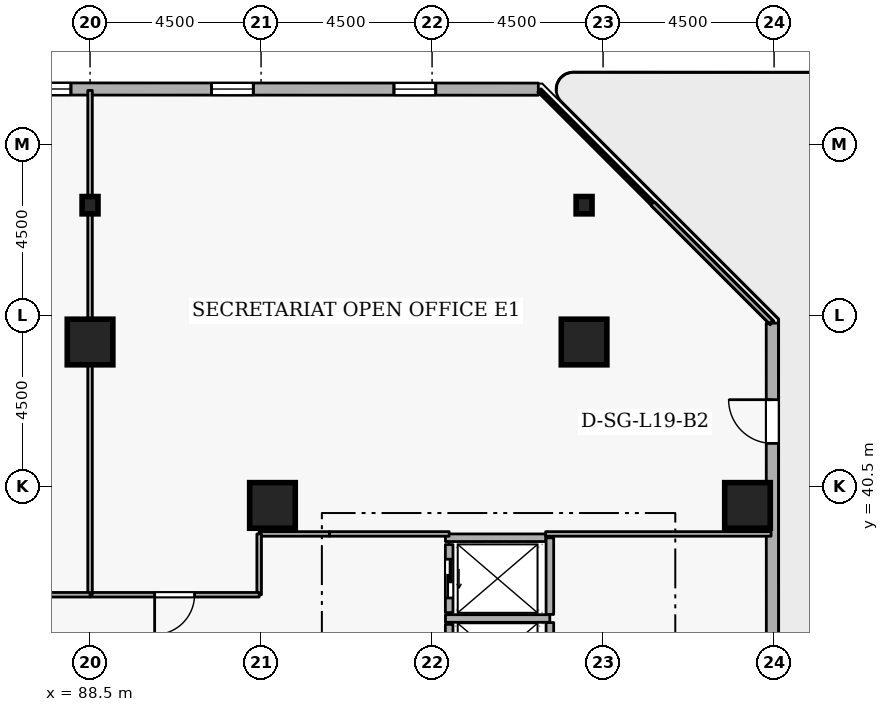
"""IFC4 building model, lengths in metres.
Left out: names, types, materials, properties, quantities, classifications, styles, units other than length and angle.
Written with IfcOpenShell. Run it as: python <this file> out.ifc"""

import sys

from ifc_helpers import new_model, si_unit, direction, frame, frame_2d, origin, origin_2d, place, context, subcontext, project, spatial, rectangle, i_section, extrude, element, fill, save


model = new_model("IFC4")
c1 = context("Model", 3, precision=1e-05, world=origin(), true_north=direction((0.0, 1.0)))
c2 = subcontext(c1, "Body", "Model", "MODEL_VIEW")
j1 = project(units=[si_unit("LENGTHUNIT", "METRE"), si_unit("PLANEANGLEUNIT", "RADIAN")], contexts=[c1])
p1 = place(None, origin())
s1 = spatial("IfcSite", under=j1, at=p1, CompositionType="ELEMENT")
p2 = place(p1, origin())
s2 = spatial("IfcBuilding", under=s1, at=p2, CompositionType="ELEMENT")
p3 = place(p2, frame((0.0, 0.0, 75.9)))
s3 = spatial("IfcBuildingStorey", under=s2, at=p3, CompositionType="ELEMENT", Elevation=75.9)
for number, where, z_axis, x_axis in (
    (1, (105.8, 40.0, 0.0), (0.0, 0.0, 1.0), (1.0, 0.0, 0.0)),
    (2, (101.5, 44.3, 0.0), (0.0, 0.0, 1.0), (1.0, 0.0, 0.0)),
    (3, (88.5, 44.3, 0.0), (0.0, 0.0, 1.0), (1.0, 0.0, 0.0)),
    (4, (93.3, 40.0, 0.0), (0.0, 0.0, 1.0), (1.0, 0.0, 0.0)),
):
    element("IfcColumn", number, at=place(p3, frame(where, z_axis=z_axis, x_axis=x_axis)), inside=s3, PredefinedType="COLUMN", context=c2, shape_type="SweptSolid", body=[
        extrude(rectangle(XDim=1.2, YDim=1.2, at=origin_2d()), origin(), (0.0, 0.0, 1.0), 4.2),
    ])
for number, where, z_axis, x_axis in (
    (5, (101.5, 47.9, 0.0), (0.0, 0.0, 1.0), (1.0, 0.0, 0.0)),
    (6, (88.5, 47.9, 0.0), (0.0, 0.0, 1.0), (1.0, 0.0, 0.0)),
):
    element("IfcColumn", number, at=place(p3, frame(where, z_axis=z_axis, x_axis=x_axis)), inside=s3, PredefinedType="COLUMN", context=c2, shape_type="SweptSolid", body=[
        extrude(i_section(OverallWidth=0.418, OverallDepth=0.456, WebThickness=0.042, FlangeThickness=0.067, FilletRadius=0.015, at=origin_2d()), origin(), (0.0, 0.0, 1.0), 4.2),
    ])
p4 = place(p3, frame((106.465, 11.619, 0.0), z_axis=(0.0, 0.0, 1.0), x_axis=(-0.000353213856, 0.99999993762, 0.0)))
e7 = element("IfcWall", 7, at=p4, inside=s3, PredefinedType="STANDARD", context=c2, shape_type="SweptSolid", body=[
    extrude(rectangle(XDim=33.177, YDim=0.32, at=frame_2d((16.589, 0.0))), origin(), (0.0, 0.0, 1.0), 3.3),
])
p5 = place(p4, frame((30.014, 0.0, 0.0)))
e8 = element("IfcOpeningElement", 8, at=p5, cuts=e7, PredefinedType="OPENING", context=c2, shape_type="SweptSolid", body=[
    extrude(rectangle(XDim=1.15, YDim=2.1, at=frame_2d((0.575, 1.05))), frame((0.0, 0.17, 0.0), z_axis=(0.0, -1.0, 0.0), x_axis=(1.0, 0.0, 0.0)), (0.0, 0.0, 1.0), 0.34),
])
p6 = place(p4, frame((7.5, 0.0, 0.72)))
e9 = element("IfcOpeningElement", 9, at=p6, cuts=e7, PredefinedType="OPENING", context=c2, shape_type="SweptSolid", body=[
    extrude(rectangle(XDim=1.1, YDim=1.8, at=frame_2d((0.55, 0.9))), frame((0.0, 0.17, 0.0), z_axis=(0.0, -1.0, 0.0), x_axis=(1.0, 0.0, 0.0)), (0.0, 0.0, 1.0), 0.34),
])
p7 = place(p4, frame((12.3, 0.0, 0.72)))
e10 = element("IfcOpeningElement", 10, at=p7, cuts=e7, PredefinedType="OPENING", context=c2, shape_type="SweptSolid", body=[
    extrude(rectangle(XDim=1.1, YDim=1.8, at=frame_2d((0.55, 0.9))), frame((0.0, 0.17, 0.0), z_axis=(0.0, -1.0, 0.0), x_axis=(1.0, 0.0, 0.0)), (0.0, 0.0, 1.0), 0.34),
])
p8 = place(p4, frame((17.1, 0.0, 0.72)))
e11 = element("IfcOpeningElement", 11, at=p8, cuts=e7, PredefinedType="OPENING", context=c2, shape_type="SweptSolid", body=[
    extrude(rectangle(XDim=1.1, YDim=1.8, at=frame_2d((0.55, 0.9))), frame((0.0, 0.17, 0.0), z_axis=(0.0, -1.0, 0.0), x_axis=(1.0, 0.0, 0.0)), (0.0, 0.0, 1.0), 0.34),
])
p9 = place(p4, frame((21.9, 0.0, 0.72)))
e12 = element("IfcOpeningElement", 12, at=p9, cuts=e7, PredefinedType="OPENING", context=c2, shape_type="SweptSolid", body=[
    extrude(rectangle(XDim=1.1, YDim=1.8, at=frame_2d((0.55, 0.9))), frame((0.0, 0.17, 0.0), z_axis=(0.0, -1.0, 0.0), x_axis=(1.0, 0.0, 0.0)), (0.0, 0.0, 1.0), 0.34),
])
p10 = place(p3, frame((100.296, 50.953, 0.0), z_axis=(0.0, 0.0, 1.0), x_axis=(-0.99999993762, 0.000353213856, 0.0)))
e13 = element("IfcWall", 13, at=p10, inside=s3, PredefinedType="STANDARD", context=c2, shape_type="SweptSolid", body=[
    extrude(rectangle(XDim=33.177, YDim=0.32, at=frame_2d((16.589, 0.0))), origin(), (0.0, 0.0, 1.0), 3.3),
])
p11 = place(p10, frame((2.7, 0.0, 0.72)))
e14 = element("IfcOpeningElement", 14, at=p11, cuts=e13, PredefinedType="OPENING", context=c2, shape_type="SweptSolid", body=[
    extrude(rectangle(XDim=1.1, YDim=1.8, at=frame_2d((0.55, 0.9))), frame((0.0, 0.17, 0.0), z_axis=(0.0, -1.0, 0.0), x_axis=(1.0, 0.0, 0.0)), (0.0, 0.0, 1.0), 0.34),
])
p12 = place(p10, frame((7.5, 0.0, 0.72)))
e15 = element("IfcOpeningElement", 15, at=p12, cuts=e13, PredefinedType="OPENING", context=c2, shape_type="SweptSolid", body=[
    extrude(rectangle(XDim=1.1, YDim=1.8, at=frame_2d((0.55, 0.9))), frame((0.0, 0.17, 0.0), z_axis=(0.0, -1.0, 0.0), x_axis=(1.0, 0.0, 0.0)), (0.0, 0.0, 1.0), 0.34),
])
p13 = place(p10, frame((12.3, 0.0, 0.72)))
e16 = element("IfcOpeningElement", 16, at=p13, cuts=e13, PredefinedType="OPENING", context=c2, shape_type="SweptSolid", body=[
    extrude(rectangle(XDim=1.1, YDim=1.8, at=frame_2d((0.55, 0.9))), frame((0.0, 0.17, 0.0), z_axis=(0.0, -1.0, 0.0), x_axis=(1.0, 0.0, 0.0)), (0.0, 0.0, 1.0), 0.34),
])
p14 = place(p10, frame((17.1, 0.0, 0.72)))
e17 = element("IfcOpeningElement", 17, at=p14, cuts=e13, PredefinedType="OPENING", context=c2, shape_type="SweptSolid", body=[
    extrude(rectangle(XDim=1.1, YDim=1.8, at=frame_2d((0.55, 0.9))), frame((0.0, 0.17, 0.0), z_axis=(0.0, -1.0, 0.0), x_axis=(1.0, 0.0, 0.0)), (0.0, 0.0, 1.0), 0.34),
])
p15 = place(p10, frame((21.9, 0.0, 0.72)))
e18 = element("IfcOpeningElement", 18, at=p15, cuts=e13, PredefinedType="OPENING", context=c2, shape_type="SweptSolid", body=[
    extrude(rectangle(XDim=1.1, YDim=1.8, at=frame_2d((0.55, 0.9))), frame((0.0, 0.17, 0.0), z_axis=(0.0, -1.0, 0.0), x_axis=(1.0, 0.0, 0.0)), (0.0, 0.0, 1.0), 0.34),
])
p16 = place(p3, frame((97.95, 36.87, 0.0), z_axis=(0.0, 0.0, 1.0), x_axis=(0.0, -1.0, 0.0)))
e19 = element("IfcWall", 19, at=p16, inside=s3, PredefinedType="STANDARD", context=c2, shape_type="SweptSolid", body=[
    extrude(rectangle(XDim=1.74, YDim=0.2, at=frame_2d((0.87, 0.0))), origin(), (0.0, 0.0, 1.0), 3.94),
])
p17 = place(p16, frame((0.36, 0.0, 0.0)))
e20 = element("IfcOpeningElement", 20, at=p17, cuts=e19, PredefinedType="OPENING", context=c2, shape_type="SweptSolid", body=[
    extrude(rectangle(XDim=1.02, YDim=2.06, at=frame_2d((0.51, 1.03))), frame((0.0, 0.11, 0.0), z_axis=(0.0, -1.0, 0.0), x_axis=(1.0, 0.0, 0.0)), (0.0, 0.0, 1.0), 0.22),
])
p18 = place(p3, frame((97.95, 38.97, 0.0), z_axis=(0.0, 0.0, 1.0), x_axis=(0.0, -1.0, 0.0)))
e21 = element("IfcWall", 21, at=p18, inside=s3, PredefinedType="STANDARD", context=c2, shape_type="SweptSolid", body=[
    extrude(rectangle(XDim=1.79, YDim=0.2, at=frame_2d((0.895, 0.0))), origin(), (0.0, 0.0, 1.0), 3.94),
])
p19 = place(p18, frame((0.385, 0.0, 0.0)))
e22 = element("IfcOpeningElement", 22, at=p19, cuts=e21, PredefinedType="OPENING", context=c2, shape_type="SweptSolid", body=[
    extrude(rectangle(XDim=1.02, YDim=2.06, at=frame_2d((0.51, 1.03))), frame((0.0, 0.11, 0.0), z_axis=(0.0, -1.0, 0.0), x_axis=(1.0, 0.0, 0.0)), (0.0, 0.0, 1.0), 0.22),
])
p20 = place(p3, frame((97.852, 37.025, 0.0), z_axis=(0.0, 0.0, 1.0), x_axis=(1.0, 0.0, 0.0)))
e23 = element("IfcWall", 23, at=p20, inside=s3, PredefinedType="STANDARD", context=c2, shape_type="SweptSolid", body=[
    extrude(rectangle(XDim=2.746, YDim=0.2, at=frame_2d((1.373, 0.0))), origin(), (0.0, 0.0, 1.0), 3.94),
])
p21 = place(p3, frame((100.6, 35.062, 0.0), z_axis=(0.0, 0.0, 1.0), x_axis=(0.0, 1.0, 0.0)))
e24 = element("IfcWall", 24, at=p21, inside=s3, PredefinedType="STANDARD", context=c2, shape_type="SweptSolid", body=[
    extrude(rectangle(XDim=1.856, YDim=0.2, at=frame_2d((0.928, 0.0))), origin(), (0.0, 0.0, 1.0), 3.94),
])
p22 = place(p3, frame((100.6, 37.132, 0.0), z_axis=(0.0, 0.0, 1.0), x_axis=(0.0, 1.0, 0.0)))
e25 = element("IfcWall", 25, at=p22, inside=s3, PredefinedType="STANDARD", context=c2, shape_type="SweptSolid", body=[
    extrude(rectangle(XDim=2.016, YDim=0.2, at=frame_2d((1.008, 0.0))), origin(), (0.0, 0.0, 1.0), 3.94),
])
p23 = place(p3, frame((97.852, 39.15, 0.0), z_axis=(0.0, 0.0, 1.0), x_axis=(1.0, 0.0, 0.0)))
e26 = element("IfcWall", 26, at=p23, inside=s3, PredefinedType="STANDARD", context=c2, shape_type="SweptSolid", body=[
    extrude(rectangle(XDim=2.636, YDim=0.2, at=frame_2d((1.318, 0.0))), origin(), (0.0, 0.0, 1.0), 3.94),
])
p24 = place(p3, frame((106.42, 39.25, 0.0), z_axis=(0.0, 0.0, 1.0), x_axis=(-1.0, 0.0, 0.0)))
e27 = element("IfcWall", 27, at=p24, inside=s3, PredefinedType="PARTITIONING", context=c2, shape_type="SweptSolid", body=[
    extrude(rectangle(XDim=5.932, YDim=0.12, at=frame_2d((2.966, 0.0))), origin(), (0.0, 0.0, 1.0), 3.94),
])
p25 = place(p3, frame((97.95, 39.25, 0.0), z_axis=(0.0, 0.0, 1.0), x_axis=(-1.0, 0.0, 0.0)))
e28 = element("IfcWall", 28, at=p25, inside=s3, PredefinedType="PARTITIONING", context=c2, shape_type="SweptSolid", body=[
    extrude(rectangle(XDim=3.15, YDim=0.12, at=frame_2d((1.575, 0.0))), origin(), (0.0, 0.0, 1.0), 3.94),
])
p26 = place(p3, frame((94.8, 39.25, 0.0), z_axis=(0.0, 0.0, 1.0), x_axis=(-1.0, 0.0, 0.0)))
e29 = element("IfcWall", 29, at=p26, inside=s3, PredefinedType="PARTITIONING", context=c2, shape_type="SweptSolid", body=[
    extrude(rectangle(XDim=1.85, YDim=0.12, at=frame_2d((0.925, 0.0))), origin(), (0.0, 0.0, 1.0), 3.94),
])
p27 = place(p3, frame((92.95, 39.25, 0.0), z_axis=(0.0, 0.0, 1.0), x_axis=(0.0, -1.0, 0.0)))
e30 = element("IfcWall", 30, at=p27, inside=s3, PredefinedType="PARTITIONING", context=c2, shape_type="SweptSolid", body=[
    extrude(rectangle(XDim=1.6, YDim=0.12, at=frame_2d((0.8, 0.0))), origin(), (0.0, 0.0, 1.0), 3.94),
])
p28 = place(p3, frame((92.95, 37.65, 0.0), z_axis=(0.0, 0.0, 1.0), x_axis=(-1.0, 0.0, 0.0)))
e31 = element("IfcWall", 31, at=p28, inside=s3, PredefinedType="PARTITIONING", context=c2, shape_type="SweptSolid", body=[
    extrude(rectangle(XDim=4.45, YDim=0.12, at=frame_2d((2.225, 0.0))), origin(), (0.0, 0.0, 1.0), 3.94),
])
p29 = place(p28, frame((1.7, 0.0, 0.0)))
e32 = element("IfcOpeningElement", 32, at=p29, cuts=e31, PredefinedType="OPENING", context=c2, shape_type="SweptSolid", body=[
    extrude(rectangle(XDim=1.05, YDim=2.1, at=frame_2d((0.525, 1.05))), frame((0.0, 0.07, 0.0), z_axis=(0.0, -1.0, 0.0), x_axis=(1.0, 0.0, 0.0)), (0.0, 0.0, 1.0), 0.14),
])
p30 = place(p3, frame((88.5, 37.65, 0.0), z_axis=(0.0, 0.0, 1.0), x_axis=(0.0, 1.0, 0.0)))
e33 = element("IfcWall", 33, at=p30, inside=s3, PredefinedType="PARTITIONING", context=c2, shape_type="SweptSolid", body=[
    extrude(rectangle(XDim=13.27, YDim=0.12, at=frame_2d((6.635, 0.0))), origin(), (0.0, 0.0, 1.0), 3.482),
])
p31 = place(p3, frame((100.325, 50.92, 0.0), z_axis=(0.0, 0.0, 1.0), x_axis=(0.707106781187, -0.707106781187, 0.0)))
e34 = element("IfcWall", 34, at=p31, inside=s3, PredefinedType="PARTITIONING", context=c2, shape_type="SweptSolid", body=[
    extrude(rectangle(XDim=8.619, YDim=0.12, at=frame_2d((4.31, 0.0))), origin(), (0.0, 0.0, 1.0), 3.94),
])
p32 = place(p3, frame((88.5, 37.65, 0.0), z_axis=(0.0, 0.0, 1.0), x_axis=(-1.0, 0.0, 0.0)))
e35 = element("IfcWall", 35, at=p32, inside=s3, PredefinedType="PARTITIONING", context=c2, shape_type="SweptSolid", body=[
    extrude(rectangle(XDim=4.45, YDim=0.12, at=frame_2d((2.225, 0.0))), origin(), (0.0, 0.0, 1.0), 3.94),
])
p33 = place(p5, origin())
e36 = element("IfcDoor", 36, at=p33, inside=s3, OperationType="SINGLE_SWING_RIGHT", PredefinedType="DOOR", context=c2, shape_type="SweptSolid", body=[
    extrude(rectangle(XDim=1.15, YDim=2.1, at=frame_2d((0.575, 1.05))), frame((0.0, 0.025, 0.0), z_axis=(0.0, -1.0, 0.0), x_axis=(1.0, 0.0, 0.0)), (0.0, 0.0, 1.0), 0.05),
])
fill(e8, e36)
p34 = place(p11, origin())
e37 = element("IfcWindow", 37, at=p34, inside=s3, PartitioningType="SINGLE_PANEL", PredefinedType="WINDOW", context=c2, shape_type="SweptSolid", body=[
    extrude(rectangle(XDim=1.1, YDim=1.8, at=frame_2d((0.55, 0.9))), frame((0.0, 0.03, 0.0), z_axis=(0.0, -1.0, 0.0), x_axis=(1.0, 0.0, 0.0)), (0.0, 0.0, 1.0), 0.06),
])
fill(e14, e37)
p35 = place(p12, origin())
e38 = element("IfcWindow", 38, at=p35, inside=s3, PartitioningType="SINGLE_PANEL", PredefinedType="WINDOW", context=c2, shape_type="SweptSolid", body=[
    extrude(rectangle(XDim=1.1, YDim=1.8, at=frame_2d((0.55, 0.9))), frame((0.0, 0.03, 0.0), z_axis=(0.0, -1.0, 0.0), x_axis=(1.0, 0.0, 0.0)), (0.0, 0.0, 1.0), 0.06),
])
fill(e15, e38)
p36 = place(p13, origin())
e39 = element("IfcWindow", 39, at=p36, inside=s3, PartitioningType="SINGLE_PANEL", PredefinedType="WINDOW", context=c2, shape_type="SweptSolid", body=[
    extrude(rectangle(XDim=1.1, YDim=1.8, at=frame_2d((0.55, 0.9))), frame((0.0, 0.03, 0.0), z_axis=(0.0, -1.0, 0.0), x_axis=(1.0, 0.0, 0.0)), (0.0, 0.0, 1.0), 0.06),
])
fill(e16, e39)
p37 = place(p19, origin())
e40 = element("IfcDoor", 40, at=p37, inside=s3, OperationType="SLIDING_TO_LEFT", PredefinedType="DOOR", context=c2, shape_type="SweptSolid", body=[
    extrude(rectangle(XDim=1.02, YDim=2.06, at=frame_2d((0.51, 1.03))), frame((0.0, 0.025, 0.0), z_axis=(0.0, -1.0, 0.0), x_axis=(1.0, 0.0, 0.0)), (0.0, 0.0, 1.0), 0.05),
])
fill(e22, e40)
p38 = place(p29, origin())
e41 = element("IfcDoor", 41, at=p38, inside=s3, OperationType="SINGLE_SWING_RIGHT", PredefinedType="DOOR", context=c2, shape_type="SweptSolid", body=[
    extrude(rectangle(XDim=1.05, YDim=2.1, at=frame_2d((0.525, 1.05))), frame((0.0, 0.025, 0.0), z_axis=(0.0, -1.0, 0.0), x_axis=(1.0, 0.0, 0.0)), (0.0, 0.0, 1.0), 0.05),
])
fill(e32, e41)
save(model, sys.argv[1])
